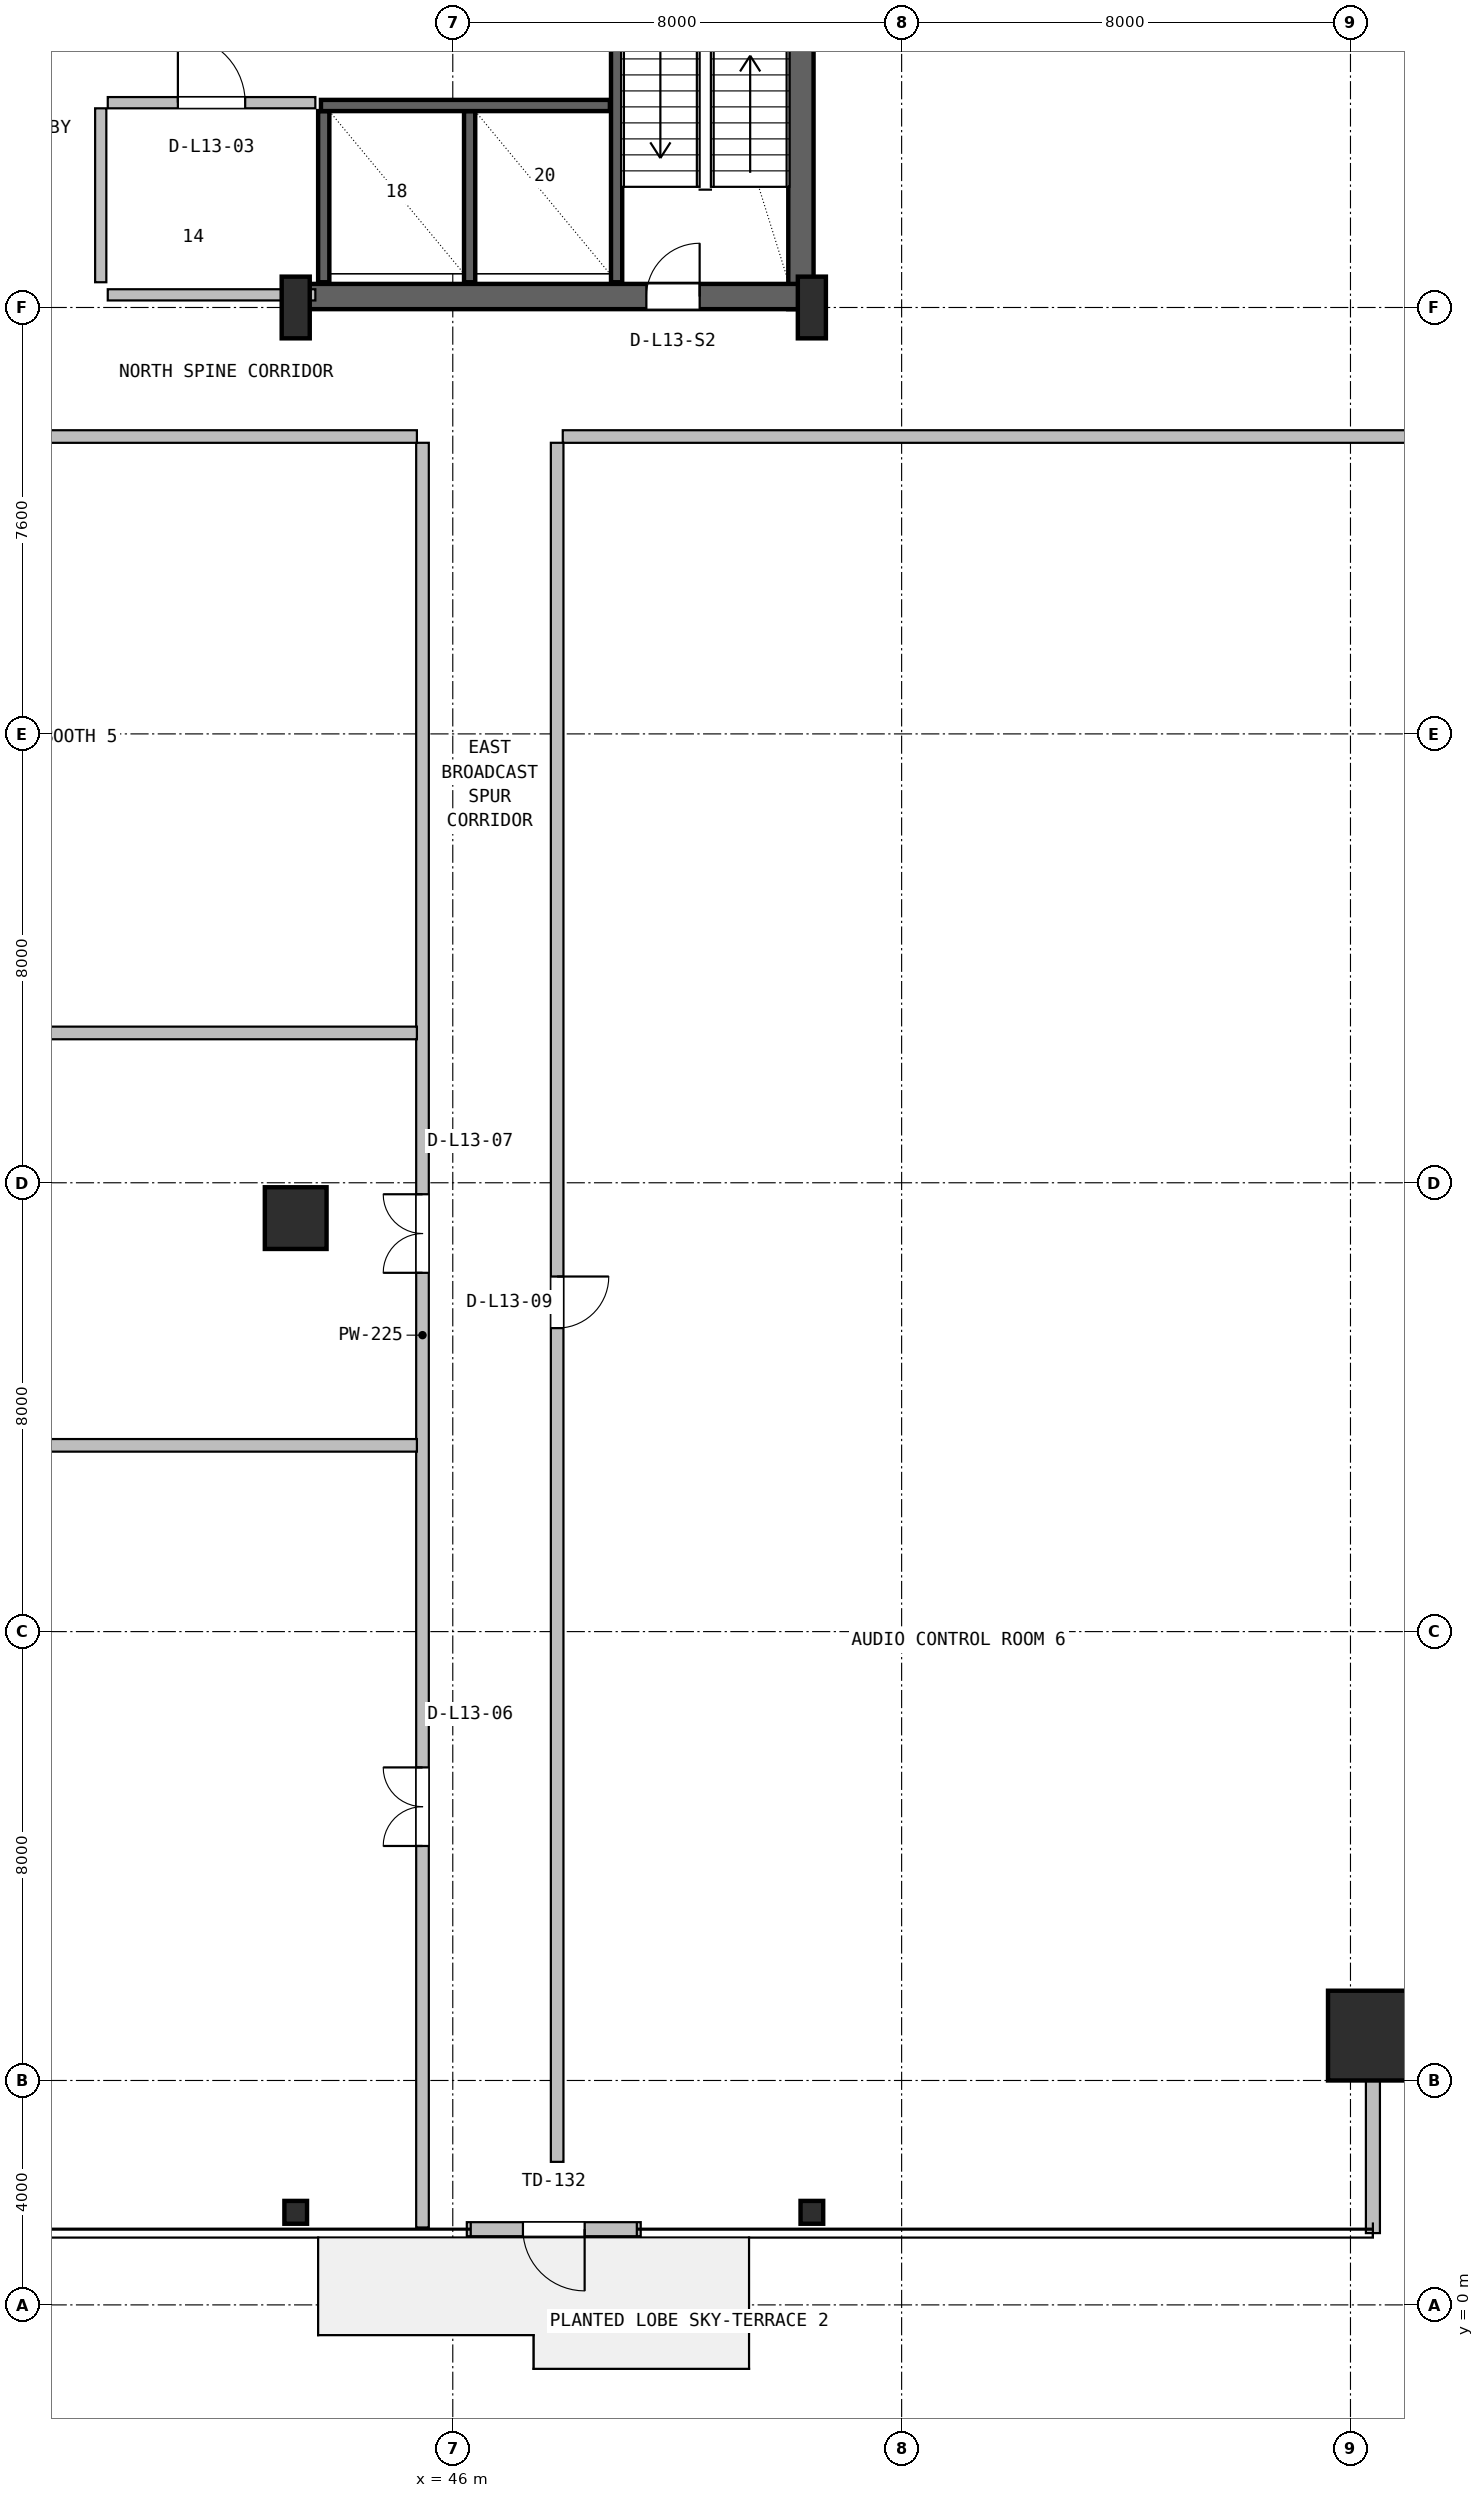
"""IFC4 building model, lengths in metres.
Left out: names, types, materials, properties, quantities, classifications, styles, units other than length and angle.
Written with IfcOpenShell. Run it as: python <this file> out.ifc"""

import sys

from ifc_helpers import new_model, si_unit, direction, frame, frame_2d, origin, origin_2d, place, context, subcontext, project, spatial, rectangle, hollow_rectangle, i_section, extrude, source, transform, mapped, element, fill, save


model = new_model("IFC4")
c1 = context("Model", 3, precision=1e-05, world=origin(), true_north=direction((0.0, 1.0)))
c2 = subcontext(c1, "Body", "Model", "MODEL_VIEW")
j1 = project(units=[si_unit("LENGTHUNIT", "METRE"), si_unit("PLANEANGLEUNIT", "RADIAN")], contexts=[c1])
p1 = place(None, origin())
s1 = spatial("IfcSite", under=j1, at=p1, CompositionType="ELEMENT")
p2 = place(p1, origin())
s2 = spatial("IfcBuilding", under=s1, at=p2, CompositionType="ELEMENT")
p3 = place(p2, frame((0.0, 0.0, 58.8)))
s3 = spatial("IfcBuildingStorey", under=s2, at=p3, CompositionType="ELEMENT", Elevation=58.8)
p4 = place(p3, frame((52.205, 35.57, 0.0), z_axis=(0.0, 0.0, 1.0), x_axis=(0.0, 1.0, 0.0)))
e1 = element("IfcWall", 1, at=p4, inside=s3, PredefinedType="SHEAR", context=c2, shape_type="SweptSolid", body=[
    extrude(rectangle(XDim=11.23, YDim=0.45, at=frame_2d((5.615, 0.0))), origin(), (0.0, 0.0, 1.0), 3.65),
])
p5 = place(p3, frame((43.2, 35.795, 0.0), z_axis=(0.0, 0.0, 1.0), x_axis=(1.0, 0.0, 0.0)))
e2 = element("IfcWall", 2, at=p5, inside=s3, PredefinedType="SHEAR", context=c2, shape_type="SweptSolid", body=[
    extrude(rectangle(XDim=9.23, YDim=0.45, at=frame_2d((4.615, 0.0))), origin(), (0.0, 0.0, 1.0), 3.65),
])
p6 = place(p5, frame((6.25, 0.0, 0.0)))
e3 = element("IfcOpeningElement", 3, at=p6, cuts=e2, PredefinedType="OPENING", context=c2, shape_type="SweptSolid", body=[
    extrude(rectangle(XDim=0.95, YDim=2.1, at=frame_2d((0.475, 1.05))), frame((0.0, 0.235, 0.0), z_axis=(0.0, -1.0, 0.0), x_axis=(1.0, 0.0, 0.0)), (0.0, 0.0, 1.0), 0.47),
])
m1 = source(origin(), c2, "Body", "SweptSolid", [
    extrude(i_section(OverallWidth=0.5, OverallDepth=1.1, WebThickness=0.018, FlangeThickness=0.032, FilletRadius=0.018, at=origin_2d()), origin(), (0.0, 0.0, 1.0), 3.9),
])
for number, where, z_axis, x_axis in (
    (4, (43.2, 35.6, 0.0), (0.0, 0.0, 1.0), (1.0, 0.0, 0.0)),
    (5, (52.4, 35.6, 0.0), (0.0, 0.0, 1.0), (1.0, 0.0, 0.0)),
):
    element("IfcColumn", number, at=place(p3, frame(where, z_axis=z_axis, x_axis=x_axis)), inside=s3, PredefinedType="COLUMN", context=c2, shape_type="MappedRepresentation", body=[
        mapped(m1, transform((0.0, 0.0, 0.0), x_axis=(1.0, 0.0, 0.0), y_axis=(0.0, 1.0, 0.0), z_axis=(0.0, 0.0, 1.0), scale=1.0)),
    ])
m2 = source(origin(), c2, "Body", "SweptSolid", [
    extrude(hollow_rectangle(XDim=1.6, YDim=1.6, WallThickness=0.06, at=origin_2d()), origin(), (0.0, 0.0, 1.0), 3.9),
])
p7 = place(p3, frame((62.4, 4.8, 0.0), z_axis=(0.0, 0.0, 1.0), x_axis=(1.0, 0.0, 0.0)))
e6 = element("IfcColumn", 6, at=p7, inside=s3, PredefinedType="COLUMN", context=c2, shape_type="MappedRepresentation", body=[
    mapped(m2, transform((0.0, 0.0, 0.0), x_axis=(1.0, 0.0, 0.0), y_axis=(0.0, 1.0, 0.0), z_axis=(0.0, 0.0, 1.0), scale=1.0)),
])
m3 = source(origin(), c2, "Body", "SweptSolid", [
    extrude(i_section(OverallWidth=0.404, OverallDepth=0.407, WebThickness=0.027, FlangeThickness=0.044, FilletRadius=0.018, at=origin_2d()), origin(), (0.0, 0.0, 1.0), 3.9),
])
for number, where, z_axis, x_axis in (
    (7, (43.2, 1.65, 0.0), (0.0, 0.0, 1.0), (1.0, 0.0, 0.0)),
    (8, (52.4, 1.65, 0.0), (0.0, 0.0, 1.0), (1.0, 0.0, 0.0)),
):
    element("IfcColumn", number, at=place(p3, frame(where, z_axis=z_axis, x_axis=x_axis)), inside=s3, PredefinedType="COLUMN", context=c2, shape_type="MappedRepresentation", body=[
        mapped(m3, transform((0.0, 0.0, 0.0), x_axis=(1.0, 0.0, 0.0), y_axis=(0.0, 1.0, 0.0), z_axis=(0.0, 0.0, 1.0), scale=1.0)),
    ])
m4 = source(origin(), c2, "Body", "SweptSolid", [
    extrude(rectangle(XDim=1.1, YDim=1.1, at=origin_2d()), origin(), (0.0, 0.0, 1.0), 3.9),
])
p8 = place(p3, frame((43.2, 19.37, 0.0), z_axis=(0.0, 0.0, 1.0), x_axis=(1.0, 0.0, 0.0)))
e9 = element("IfcColumn", 9, at=p8, inside=s3, PredefinedType="COLUMN", context=c2, shape_type="MappedRepresentation", body=[
    mapped(m4, transform((0.0, 0.0, 0.0), x_axis=(1.0, 0.0, 0.0), y_axis=(0.0, 1.0, 0.0), z_axis=(0.0, 0.0, 1.0), scale=1.0)),
])
p9 = place(p3, frame((46.25, 1.35, 0.0), z_axis=(0.0, 0.0, 1.0), x_axis=(1.0, 0.0, 0.0)))
e10 = element("IfcWall", 10, at=p9, inside=s3, PredefinedType="SOLIDWALL", context=c2, shape_type="SweptSolid", body=[
    extrude(rectangle(XDim=3.1, YDim=0.25, at=frame_2d((1.55, 0.0))), origin(), (0.0, 0.0, 1.0), 3.63),
])
p10 = place(p9, frame((1.0, 0.0, 0.0)))
e11 = element("IfcOpeningElement", 11, at=p10, cuts=e10, PredefinedType="OPENING", context=c2, shape_type="SweptSolid", body=[
    extrude(rectangle(XDim=1.1, YDim=2.15, at=frame_2d((0.55, 1.075))), frame((0.0, 0.135, 0.0), z_axis=(0.0, -1.0, 0.0), x_axis=(1.0, 0.0, 0.0)), (0.0, 0.0, 1.0), 0.27),
])
p11 = place(p3, frame((62.4, 1.28, 0.0), z_axis=(0.0, 0.0, 1.0), x_axis=(0.0, 1.0, 0.0)))
e12 = element("IfcWall", 12, at=p11, inside=s3, PredefinedType="SOLIDWALL", context=c2, shape_type="SweptSolid", body=[
    extrude(rectangle(XDim=3.6, YDim=0.25, at=frame_2d((1.8, 0.0))), origin(), (0.0, 0.0, 1.0), 3.208),
])
p12 = place(p3, frame((48.92, 36.05, 0.0), z_axis=(0.0, 0.0, 1.0), x_axis=(0.0, 1.0, 0.0)))
e13 = element("IfcWall", 13, at=p12, inside=s3, PredefinedType="SHEAR", context=c2, shape_type="SweptSolid", body=[
    extrude(rectangle(XDim=10.5, YDim=0.2, at=frame_2d((5.25, 0.0))), origin(), (0.0, 0.0, 1.0), 3.65),
])
for number, where, z_axis, x_axis in (
    (14, (43.7, 36.05, 0.0), (0.0, 0.0, 1.0), (0.0, 1.0, 0.0)),
    (15, (46.3, 36.05, 0.0), (0.0, 0.0, 1.0), (0.0, 1.0, 0.0)),
):
    element("IfcWall", number, at=place(p3, frame(where, z_axis=z_axis, x_axis=x_axis)), inside=s3, PredefinedType="SHEAR", context=c2, shape_type="SweptSolid", body=[
        extrude(rectangle(XDim=3.05, YDim=0.2, at=frame_2d((1.525, 0.0))), origin(), (0.0, 0.0, 1.0), 3.65),
    ])
p13 = place(p3, frame((43.65, 39.2, 0.0), z_axis=(0.0, 0.0, 1.0), x_axis=(1.0, 0.0, 0.0)))
e16 = element("IfcWall", 16, at=p13, inside=s3, PredefinedType="SHEAR", context=c2, shape_type="SweptSolid", body=[
    extrude(rectangle(XDim=5.15, YDim=0.2, at=frame_2d((2.575, 0.0))), origin(), (0.0, 0.0, 1.0), 3.65),
])
p14 = place(p3, frame((39.85, 35.825, 0.0), z_axis=(0.0, 0.0, 1.0), x_axis=(1.0, 0.0, 0.0)))
e17 = element("IfcWall", 17, at=p14, inside=s3, PredefinedType="SOLIDWALL", context=c2, shape_type="SweptSolid", body=[
    extrude(rectangle(XDim=3.7, YDim=0.2, at=frame_2d((1.85, 0.0))), origin(), (0.0, 0.0, 1.0), 2.425),
])
p15 = place(p3, frame((39.85, 39.25, 0.0), z_axis=(0.0, 0.0, 1.0), x_axis=(1.0, 0.0, 0.0)))
e18 = element("IfcWall", 18, at=p15, inside=s3, PredefinedType="SOLIDWALL", context=c2, shape_type="SweptSolid", body=[
    extrude(rectangle(XDim=3.7, YDim=0.2, at=frame_2d((1.85, 0.0))), origin(), (0.0, 0.0, 1.0), 3.63),
])
p16 = place(p15, frame((1.25, 0.0, 0.0)))
e19 = element("IfcOpeningElement", 19, at=p16, cuts=e18, PredefinedType="OPENING", context=c2, shape_type="SweptSolid", body=[
    extrude(rectangle(XDim=1.2, YDim=2.1, at=frame_2d((0.6, 1.05))), frame((0.0, 0.11, 0.0), z_axis=(0.0, -1.0, 0.0), x_axis=(1.0, 0.0, 0.0)), (0.0, 0.0, 1.0), 0.22),
])
p17 = place(p3, frame((39.725, 36.05, 0.0), z_axis=(0.0, 0.0, 1.0), x_axis=(0.0, 1.0, 0.0)))
e20 = element("IfcWall", 20, at=p17, inside=s3, PredefinedType="SOLIDWALL", context=c2, shape_type="SweptSolid", body=[
    extrude(rectangle(XDim=3.1, YDim=0.2, at=frame_2d((1.55, 0.0))), origin(), (0.0, 0.0, 1.0), 3.63),
])
p18 = place(p3, frame((45.46, 1.38, 0.0), z_axis=(0.0, 0.0, 1.0), x_axis=(0.0, 1.0, 0.0)))
e21 = element("IfcWall", 21, at=p18, inside=s3, PredefinedType="PARTITIONING", context=c2, shape_type="SweptSolid", body=[
    extrude(rectangle(XDim=31.808, YDim=0.225, at=frame_2d((15.904, 0.0))), origin(), (0.0, 0.0, 1.0), 3.208),
])
p19 = place(p18, frame((6.8, 0.0, 0.0)))
e22 = element("IfcOpeningElement", 22, at=p19, cuts=e21, PredefinedType="OPENING", context=c2, shape_type="SweptSolid", body=[
    extrude(rectangle(XDim=1.4, YDim=2.12, at=frame_2d((0.7, 1.06))), frame((0.0, 0.123, 0.0), z_axis=(0.0, -1.0, 0.0), x_axis=(1.0, 0.0, 0.0)), (0.0, 0.0, 1.0), 0.245),
])
p20 = place(p18, frame((17.015, 0.0, 0.0)))
e23 = element("IfcOpeningElement", 23, at=p20, cuts=e21, PredefinedType="OPENING", context=c2, shape_type="SweptSolid", body=[
    extrude(rectangle(XDim=1.4, YDim=2.12, at=frame_2d((0.7, 1.06))), frame((0.0, 0.123, 0.0), z_axis=(0.0, -1.0, 0.0), x_axis=(1.0, 0.0, 0.0)), (0.0, 0.0, 1.0), 0.245),
])
for number, where, z_axis, x_axis in (
    (24, (19.07, 15.32, 0.0), (0.0, 0.0, 1.0), (1.0, 0.0, 0.0)),
    (25, (19.07, 22.67, 0.0), (0.0, 0.0, 1.0), (1.0, 0.0, 0.0)),
):
    element("IfcWall", number, at=place(p3, frame(where, z_axis=z_axis, x_axis=x_axis)), inside=s3, PredefinedType="PARTITIONING", context=c2, shape_type="SweptSolid", body=[
        extrude(rectangle(XDim=26.29, YDim=0.225, at=frame_2d((13.145, 0.0))), origin(), (0.0, 0.0, 1.0), 2.852),
    ])
p21 = place(p3, frame((19.07, 33.3, 0.0), z_axis=(0.0, 0.0, 1.0), x_axis=(1.0, 0.0, 0.0)))
e26 = element("IfcWall", 26, at=p21, inside=s3, PredefinedType="PARTITIONING", context=c2, shape_type="SweptSolid", body=[
    extrude(rectangle(XDim=26.29, YDim=0.225, at=frame_2d((13.145, 0.0))), origin(), (0.0, 0.0, 1.0), 2.852),
])
p22 = place(p21, frame((12.445, 0.0, 0.0)))
e27 = element("IfcOpeningElement", 27, at=p22, cuts=e26, PredefinedType="OPENING", context=c2, shape_type="SweptSolid", body=[
    extrude(rectangle(XDim=1.4, YDim=2.12, at=frame_2d((0.7, 1.06))), frame((0.0, 0.123, 0.0), z_axis=(0.0, -1.0, 0.0), x_axis=(1.0, 0.0, 0.0)), (0.0, 0.0, 1.0), 0.245),
])
p23 = place(p3, frame((47.96, 33.3, 0.0), z_axis=(0.0, 0.0, 1.0), x_axis=(1.0, 0.0, 0.0)))
e28 = element("IfcWall", 28, at=p23, inside=s3, PredefinedType="PARTITIONING", context=c2, shape_type="SweptSolid", body=[
    extrude(rectangle(XDim=17.86, YDim=0.225, at=frame_2d((8.93, 0.0))), origin(), (0.0, 0.0, 1.0), 3.208),
])
p24 = place(p3, frame((47.86, 2.55, 0.0), z_axis=(0.0, 0.0, 1.0), x_axis=(0.0, 1.0, 0.0)))
e29 = element("IfcWall", 29, at=p24, inside=s3, PredefinedType="PARTITIONING", context=c2, shape_type="SweptSolid", body=[
    extrude(rectangle(XDim=30.638, YDim=0.225, at=frame_2d((15.319, 0.0))), origin(), (0.0, 0.0, 1.0), 3.322),
])
p25 = place(p24, frame((14.859, 0.0, 0.0)))
e30 = element("IfcOpeningElement", 30, at=p25, cuts=e29, PredefinedType="OPENING", context=c2, shape_type="SweptSolid", body=[
    extrude(rectangle(XDim=0.92, YDim=2.08, at=frame_2d((0.46, 1.04))), frame((0.0, 0.123, 0.0), z_axis=(0.0, -1.0, 0.0), x_axis=(1.0, 0.0, 0.0)), (0.0, 0.0, 1.0), 0.245),
])
m5 = source(origin(), c2, "Body", "SweptSolid", [
    extrude(rectangle(XDim=1.1, YDim=2.15, at=frame_2d((0.55, 1.075))), frame((0.0, 0.025, 0.0), z_axis=(0.0, -1.0, 0.0), x_axis=(1.0, 0.0, 0.0)), (0.0, 0.0, 1.0), 0.05),
])
p26 = place(p10, frame((1.1, 0.0, 0.0), z_axis=(0.0, 0.0, 1.0), x_axis=(-1.0, 0.0, 0.0)))
e31 = element("IfcDoor", 31, at=p26, inside=s3, OperationType="SINGLE_SWING_RIGHT", PredefinedType="DOOR", context=c2, shape_type="MappedRepresentation", body=[
    mapped(m5, transform((0.0, 0.0, 0.0), x_axis=(1.0, 0.0, 0.0), y_axis=(0.0, 1.0, 0.0), z_axis=(0.0, 0.0, 1.0), scale=1.0)),
])
fill(e11, e31)
m6 = source(origin(), c2, "Body", "SweptSolid", [
    extrude(rectangle(XDim=0.95, YDim=2.1, at=frame_2d((0.475, 1.05))), frame((0.0, 0.025, 0.0), z_axis=(0.0, -1.0, 0.0), x_axis=(1.0, 0.0, 0.0)), (0.0, 0.0, 1.0), 0.05),
])
p27 = place(p6, origin())
e32 = element("IfcDoor", 32, at=p27, inside=s3, OperationType="SINGLE_SWING_RIGHT", PredefinedType="DOOR", context=c2, shape_type="MappedRepresentation", body=[
    mapped(m6, transform((0.0, 0.0, 0.0), x_axis=(1.0, 0.0, 0.0), y_axis=(0.0, 1.0, 0.0), z_axis=(0.0, 0.0, 1.0), scale=1.0)),
])
fill(e3, e32)
m7 = source(origin(), c2, "Body", "SweptSolid", [
    extrude(rectangle(XDim=1.2, YDim=2.1, at=frame_2d((0.6, 1.05))), frame((0.0, 0.025, 0.0), z_axis=(0.0, -1.0, 0.0), x_axis=(1.0, 0.0, 0.0)), (0.0, 0.0, 1.0), 0.05),
])
p28 = place(p16, origin())
e33 = element("IfcDoor", 33, at=p28, inside=s3, OperationType="SINGLE_SWING_LEFT", PredefinedType="DOOR", context=c2, shape_type="MappedRepresentation", body=[
    mapped(m7, transform((0.0, 0.0, 0.0), x_axis=(1.0, 0.0, 0.0), y_axis=(0.0, 1.0, 0.0), z_axis=(0.0, 0.0, 1.0), scale=1.0)),
])
fill(e19, e33)
m8 = source(origin(), c2, "Body", "SweptSolid", [
    extrude(rectangle(XDim=1.4, YDim=2.12, at=frame_2d((0.7, 1.06))), frame((0.0, 0.025, 0.0), z_axis=(0.0, -1.0, 0.0), x_axis=(1.0, 0.0, 0.0)), (0.0, 0.0, 1.0), 0.05),
])
p29 = place(p19, origin())
e34 = element("IfcDoor", 34, at=p29, inside=s3, OperationType="DOUBLE_DOOR_SINGLE_SWING", PredefinedType="DOOR", context=c2, shape_type="MappedRepresentation", body=[
    mapped(m8, transform((0.0, 0.0, 0.0), x_axis=(1.0, 0.0, 0.0), y_axis=(0.0, 1.0, 0.0), z_axis=(0.0, 0.0, 1.0), scale=1.0)),
])
fill(e22, e34)
p30 = place(p20, origin())
e35 = element("IfcDoor", 35, at=p30, inside=s3, OperationType="DOUBLE_DOOR_SINGLE_SWING", PredefinedType="DOOR", context=c2, shape_type="MappedRepresentation", body=[
    mapped(m8, transform((0.0, 0.0, 0.0), x_axis=(1.0, 0.0, 0.0), y_axis=(0.0, 1.0, 0.0), z_axis=(0.0, 0.0, 1.0), scale=1.0)),
])
fill(e23, e35)
m9 = source(origin(), c2, "Body", "SweptSolid", [
    extrude(rectangle(XDim=0.92, YDim=2.08, at=frame_2d((0.46, 1.04))), frame((0.0, 0.025, 0.0), z_axis=(0.0, -1.0, 0.0), x_axis=(1.0, 0.0, 0.0)), (0.0, 0.0, 1.0), 0.05),
])
p31 = place(p25, frame((0.92, 0.0, 0.0), z_axis=(0.0, 0.0, 1.0), x_axis=(-1.0, 0.0, 0.0)))
e36 = element("IfcDoor", 36, at=p31, inside=s3, OperationType="SINGLE_SWING_RIGHT", PredefinedType="DOOR", context=c2, shape_type="MappedRepresentation", body=[
    mapped(m9, transform((0.0, 0.0, 0.0), x_axis=(1.0, 0.0, 0.0), y_axis=(0.0, 1.0, 0.0), z_axis=(0.0, 0.0, 1.0), scale=1.0)),
])
fill(e30, e36)
save(model, sys.argv[1])
